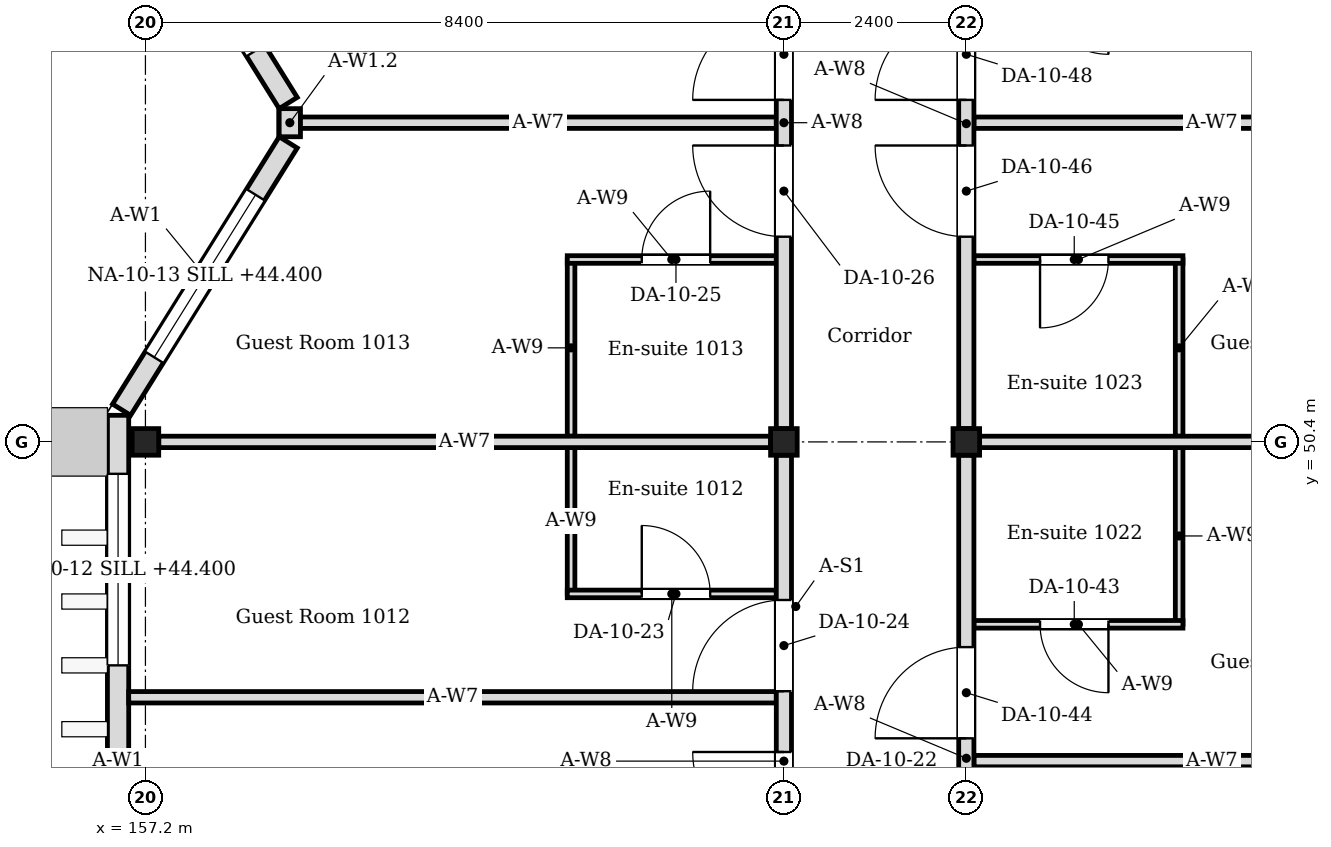
"""IFC4 building model, lengths in metres.
Left out: names, types, materials, properties, quantities, classifications, styles, units other than length and angle.
Written with IfcOpenShell. Run it as: python <this file> out.ifc"""

import sys

from ifc_helpers import new_model, si_unit, direction, frame, frame_2d, origin, origin_2d, place, context, subcontext, project, spatial, rectangle, i_section, extrude, element, fill, save


model = new_model("IFC4")
c1 = context("Model", 3, precision=1e-05, world=origin(), true_north=direction((0.0, 1.0)))
c2 = subcontext(c1, "Body", "Model", "MODEL_VIEW")
j1 = project(units=[si_unit("LENGTHUNIT", "METRE"), si_unit("PLANEANGLEUNIT", "RADIAN")], contexts=[c1])
p1 = place(None, origin())
s1 = spatial("IfcSite", under=j1, at=p1, CompositionType="ELEMENT")
p2 = place(p1, origin())
s2 = spatial("IfcBuilding", under=s1, at=p2, CompositionType="ELEMENT")
p3 = place(p2, frame((0.0, 0.0, 43.8)))
s3 = spatial("IfcBuildingStorey", under=s2, at=p3, CompositionType="ELEMENT", Elevation=43.8)
for number, where, z_axis, x_axis in (
    (1, (157.2, 50.4, 0.0), (0.0, 0.0, 1.0), (1.0, 0.0, 0.0)),
    (2, (165.6, 50.4, 0.0), (0.0, 0.0, 1.0), (1.0, 0.0, 0.0)),
    (3, (168.0, 50.4, 0.0), (0.0, 0.0, 1.0), (1.0, 0.0, 0.0)),
):
    element("IfcColumn", number, at=place(p3, frame(where, z_axis=z_axis, x_axis=x_axis)), inside=s3, PredefinedType="COLUMN", context=c2, shape_type="SweptSolid", body=[
        extrude(i_section(OverallWidth=0.35, OverallDepth=0.35, WebThickness=0.012, FlangeThickness=0.019, FilletRadius=0.013, at=origin_2d()), origin(), (0.0, 0.0, 1.0), 4.2),
    ])
p4 = place(p3, frame((156.84, 41.65, 0.0), z_axis=(0.0, 0.0, 1.0), x_axis=(0.0, 1.0, 0.0)))
e4 = element("IfcWall", 4, at=p4, inside=s3, PredefinedType="SOLIDWALL", context=c2, shape_type="SweptSolid", body=[
    extrude(rectangle(XDim=9.1, YDim=0.28, at=frame_2d((4.55, 0.0))), origin(), (0.0, 0.0, 1.0), 4.05),
])
p5 = place(p4, frame((1.61, 0.0, 0.6)))
e5 = element("IfcOpeningElement", 5, at=p5, cuts=e4, PredefinedType="OPENING", context=c2, shape_type="SweptSolid", body=[
    extrude(rectangle(XDim=2.52, YDim=2.4, at=frame_2d((1.26, 1.2))), frame((0.0, 0.15, 0.0), z_axis=(0.0, -1.0, 0.0), x_axis=(1.0, 0.0, 0.0)), (0.0, 0.0, 1.0), 0.3),
])
p6 = place(p4, frame((5.81, 0.0, 0.6)))
e6 = element("IfcOpeningElement", 6, at=p6, cuts=e4, PredefinedType="OPENING", context=c2, shape_type="SweptSolid", body=[
    extrude(rectangle(XDim=2.52, YDim=2.4, at=frame_2d((1.26, 1.2))), frame((0.0, 0.15, 0.0), z_axis=(0.0, -1.0, 0.0), x_axis=(1.0, 0.0, 0.0)), (0.0, 0.0, 1.0), 0.3),
])
p7 = place(p3, frame((156.886, 50.824, 0.0), z_axis=(0.0, 0.0, 1.0), x_axis=(0.529018946142, 0.848610013271, 0.0)))
e7 = element("IfcWall", 7, at=p7, inside=s3, PredefinedType="SOLIDWALL", context=c2, shape_type="SweptSolid", body=[
    extrude(rectangle(XDim=4.144, YDim=0.28, at=frame_2d((2.072, 0.0))), origin(), (0.0, 0.0, 1.0), 4.05),
])
p8 = place(p7, frame((0.812, 0.0, 0.6)))
e8 = element("IfcOpeningElement", 8, at=p8, cuts=e7, PredefinedType="OPENING", context=c2, shape_type="SweptSolid", body=[
    extrude(rectangle(XDim=2.52, YDim=2.4, at=frame_2d((1.26, 1.2))), frame((0.0, 0.15, 0.0), z_axis=(0.0, -1.0, 0.0), x_axis=(1.0, 0.0, 0.0)), (0.0, 0.0, 1.0), 0.3),
])
p9 = place(p3, frame((159.079, 54.859, 0.0), z_axis=(0.0, 0.0, 1.0), x_axis=(-0.528992500338, 0.848626498871, 0.0)))
e9 = element("IfcWall", 9, at=p9, inside=s3, PredefinedType="SOLIDWALL", context=c2, shape_type="SweptSolid", body=[
    extrude(rectangle(XDim=4.145, YDim=0.28, at=frame_2d((2.072, 0.0))), origin(), (0.0, 0.0, 1.0), 4.05),
])
p10 = place(p9, frame((0.812, 0.0, 0.6)))
e10 = element("IfcOpeningElement", 10, at=p10, cuts=e9, PredefinedType="OPENING", context=c2, shape_type="SweptSolid", body=[
    extrude(rectangle(XDim=2.52, YDim=2.4, at=frame_2d((1.26, 1.2))), frame((0.0, 0.15, 0.0), z_axis=(0.0, -1.0, 0.0), x_axis=(1.0, 0.0, 0.0)), (0.0, 0.0, 1.0), 0.3),
])
p11 = place(p3, frame((159.1, 54.415, 0.0), z_axis=(0.0, 0.0, 1.0), x_axis=(0.0, 1.0, 0.0)))
e11 = element("IfcWall", 11, at=p11, inside=s3, PredefinedType="SOLIDWALL", context=c2, shape_type="SweptSolid", body=[
    extrude(rectangle(XDim=0.37, YDim=0.28, at=frame_2d((0.185, 0.0))), origin(), (0.0, 0.0, 1.0), 3.604),
])
p12 = place(p3, frame((162.8, 48.4, 0.0), z_axis=(0.0, 0.0, 1.0), x_axis=(0.0, 1.0, 0.0)))
e12 = element("IfcWall", 12, at=p12, inside=s3, PredefinedType="PARTITIONING", context=c2, shape_type="SweptSolid", body=[
    extrude(rectangle(XDim=1.925, YDim=0.1, at=frame_2d((0.962, 0.0))), origin(), (0.0, 0.0, 1.0), 4.05),
])
p13 = place(p3, frame((162.75, 48.4, 0.0), z_axis=(0.0, 0.0, 1.0), x_axis=(1.0, 0.0, 0.0)))
e13 = element("IfcWall", 13, at=p13, inside=s3, PredefinedType="PARTITIONING", context=c2, shape_type="SweptSolid", body=[
    extrude(rectangle(XDim=2.75, YDim=0.1, at=frame_2d((1.375, 0.0))), origin(), (0.0, 0.0, 1.0), 4.05),
])
p14 = place(p13, frame((0.98, 0.0, 0.0)))
e14 = element("IfcOpeningElement", 14, at=p14, cuts=e13, PredefinedType="OPENING", context=c2, shape_type="SweptSolid", body=[
    extrude(rectangle(XDim=0.9, YDim=2.1, at=frame_2d((0.45, 1.05))), frame((0.0, 0.06, 0.0), z_axis=(0.0, -1.0, 0.0), x_axis=(1.0, 0.0, 0.0)), (0.0, 0.0, 1.0), 0.12),
])
p15 = place(p3, frame((162.8, 50.475, 0.0), z_axis=(0.0, 0.0, 1.0), x_axis=(0.0, 1.0, 0.0)))
e15 = element("IfcWall", 15, at=p15, inside=s3, PredefinedType="PARTITIONING", context=c2, shape_type="SweptSolid", body=[
    extrude(rectangle(XDim=2.325, YDim=0.1, at=frame_2d((1.163, 0.0))), origin(), (0.0, 0.0, 1.0), 4.05),
])
p16 = place(p3, frame((162.75, 52.8, 0.0), z_axis=(0.0, 0.0, 1.0), x_axis=(1.0, 0.0, 0.0)))
e16 = element("IfcWall", 16, at=p16, inside=s3, PredefinedType="PARTITIONING", context=c2, shape_type="SweptSolid", body=[
    extrude(rectangle(XDim=2.75, YDim=0.1, at=frame_2d((1.375, 0.0))), origin(), (0.0, 0.0, 1.0), 4.05),
])
p17 = place(p16, frame((0.98, 0.0, 0.0)))
e17 = element("IfcOpeningElement", 17, at=p17, cuts=e16, PredefinedType="OPENING", context=c2, shape_type="SweptSolid", body=[
    extrude(rectangle(XDim=0.9, YDim=2.1, at=frame_2d((0.45, 1.05))), frame((0.0, 0.06, 0.0), z_axis=(0.0, -1.0, 0.0), x_axis=(1.0, 0.0, 0.0)), (0.0, 0.0, 1.0), 0.12),
])
p18 = place(p3, frame((170.8, 48.0, 0.0), z_axis=(0.0, 0.0, 1.0), x_axis=(0.0, 1.0, 0.0)))
e18 = element("IfcWall", 18, at=p18, inside=s3, PredefinedType="PARTITIONING", context=c2, shape_type="SweptSolid", body=[
    extrude(rectangle(XDim=2.325, YDim=0.1, at=frame_2d((1.163, 0.0))), origin(), (0.0, 0.0, 1.0), 4.05),
])
p19 = place(p3, frame((170.85, 48.0, 0.0), z_axis=(0.0, 0.0, 1.0), x_axis=(-1.0, 0.0, 0.0)))
e19 = element("IfcWall", 19, at=p19, inside=s3, PredefinedType="PARTITIONING", context=c2, shape_type="SweptSolid", body=[
    extrude(rectangle(XDim=2.75, YDim=0.1, at=frame_2d((1.375, 0.0))), origin(), (0.0, 0.0, 1.0), 4.05),
])
p20 = place(p19, frame((0.98, 0.0, 0.0)))
e20 = element("IfcOpeningElement", 20, at=p20, cuts=e19, PredefinedType="OPENING", context=c2, shape_type="SweptSolid", body=[
    extrude(rectangle(XDim=0.9, YDim=2.1, at=frame_2d((0.45, 1.05))), frame((0.0, 0.06, 0.0), z_axis=(0.0, -1.0, 0.0), x_axis=(1.0, 0.0, 0.0)), (0.0, 0.0, 1.0), 0.12),
])
p21 = place(p3, frame((170.8, 50.475, 0.0), z_axis=(0.0, 0.0, 1.0), x_axis=(0.0, 1.0, 0.0)))
e21 = element("IfcWall", 21, at=p21, inside=s3, PredefinedType="PARTITIONING", context=c2, shape_type="SweptSolid", body=[
    extrude(rectangle(XDim=2.325, YDim=0.1, at=frame_2d((1.163, 0.0))), origin(), (0.0, 0.0, 1.0), 4.05),
])
p22 = place(p3, frame((170.85, 52.8, 0.0), z_axis=(0.0, 0.0, 1.0), x_axis=(-1.0, 0.0, 0.0)))
e22 = element("IfcWall", 22, at=p22, inside=s3, PredefinedType="PARTITIONING", context=c2, shape_type="SweptSolid", body=[
    extrude(rectangle(XDim=2.75, YDim=0.1, at=frame_2d((1.375, 0.0))), origin(), (0.0, 0.0, 1.0), 4.05),
])
p23 = place(p22, frame((0.98, 0.0, 0.0)))
e23 = element("IfcOpeningElement", 23, at=p23, cuts=e22, PredefinedType="OPENING", context=c2, shape_type="SweptSolid", body=[
    extrude(rectangle(XDim=0.9, YDim=2.1, at=frame_2d((0.45, 1.05))), frame((0.0, 0.06, 0.0), z_axis=(0.0, -1.0, 0.0), x_axis=(1.0, 0.0, 0.0)), (0.0, 0.0, 1.0), 0.12),
])
for number, where, z_axis, x_axis in (
    (24, (157.375, 50.4, 0.0), (0.0, 0.0, 1.0), (1.0, 0.0, 0.0)),
    (25, (168.175, 50.4, 0.0), (0.0, 0.0, 1.0), (1.0, 0.0, 0.0)),
):
    element("IfcWall", number, at=place(p3, frame(where, z_axis=z_axis, x_axis=x_axis)), inside=s3, PredefinedType="PARTITIONING", context=c2, shape_type="SweptSolid", body=[
        extrude(rectangle(XDim=8.05, YDim=0.15, at=frame_2d((4.025, 0.0))), origin(), (0.0, 0.0, 1.0), 3.604),
    ])
p24 = place(p3, frame((156.98, 47.04, 0.0), z_axis=(0.0, 0.0, 1.0), x_axis=(1.0, 0.0, 0.0)))
e26 = element("IfcWall", 26, at=p24, inside=s3, PredefinedType="PARTITIONING", context=c2, shape_type="SweptSolid", body=[
    extrude(rectangle(XDim=8.52, YDim=0.15, at=frame_2d((4.26, 0.0))), origin(), (0.0, 0.0, 1.0), 3.604),
])
for number, where, z_axis, x_axis in (
    (27, (159.24, 54.6, 0.0), (0.0, 0.0, 1.0), (1.0, 0.0, 0.0)),
    (28, (168.1, 46.2, 0.0), (0.0, 0.0, 1.0), (1.0, 0.0, 0.0)),
    (29, (168.1, 54.6, 0.0), (0.0, 0.0, 1.0), (1.0, 0.0, 0.0)),
):
    element("IfcWall", number, at=place(p3, frame(where, z_axis=z_axis, x_axis=x_axis)), inside=s3, PredefinedType="PARTITIONING", context=c2, shape_type="SweptSolid", body=[
        extrude(rectangle(XDim=6.26, YDim=0.15, at=frame_2d((3.13, 0.0))), origin(), (0.0, 0.0, 1.0), 3.604),
    ])
p25 = place(p3, frame((165.6, 42.175, 0.0), z_axis=(0.0, 0.0, 1.0), x_axis=(0.0, 1.0, 0.0)))
e30 = element("IfcWall", 30, at=p25, inside=s3, PredefinedType="PARTITIONING", context=c2, shape_type="SweptSolid", body=[
    extrude(rectangle(XDim=8.05, YDim=0.2, at=frame_2d((4.025, 0.0))), origin(), (0.0, 0.0, 1.0), 3.45),
])
p26 = place(p25, frame((2.945, 0.0, 0.0)))
e31 = element("IfcOpeningElement", 31, at=p26, cuts=e30, PredefinedType="OPENING", context=c2, shape_type="SweptSolid", body=[
    extrude(rectangle(XDim=1.2, YDim=2.1, at=frame_2d((0.6, 1.05))), frame((0.0, 0.11, 0.0), z_axis=(0.0, -1.0, 0.0), x_axis=(1.0, 0.0, 0.0)), (0.0, 0.0, 1.0), 0.22),
])
p27 = place(p25, frame((4.945, 0.0, 0.0)))
e32 = element("IfcOpeningElement", 32, at=p27, cuts=e30, PredefinedType="OPENING", context=c2, shape_type="SweptSolid", body=[
    extrude(rectangle(XDim=1.2, YDim=2.1, at=frame_2d((0.6, 1.05))), frame((0.0, 0.11, 0.0), z_axis=(0.0, -1.0, 0.0), x_axis=(1.0, 0.0, 0.0)), (0.0, 0.0, 1.0), 0.22),
])
p28 = place(p3, frame((165.6, 50.575, 0.0), z_axis=(0.0, 0.0, 1.0), x_axis=(0.0, 1.0, 0.0)))
e33 = element("IfcWall", 33, at=p28, inside=s3, PredefinedType="PARTITIONING", context=c2, shape_type="SweptSolid", body=[
    extrude(rectangle(XDim=8.05, YDim=0.2, at=frame_2d((4.025, 0.0))), origin(), (0.0, 0.0, 1.0), 3.45),
])
p29 = place(p28, frame((2.525, 0.0, 0.0)))
e34 = element("IfcOpeningElement", 34, at=p29, cuts=e33, PredefinedType="OPENING", context=c2, shape_type="SweptSolid", body=[
    extrude(rectangle(XDim=1.2, YDim=2.1, at=frame_2d((0.6, 1.05))), frame((0.0, 0.11, 0.0), z_axis=(0.0, -1.0, 0.0), x_axis=(1.0, 0.0, 0.0)), (0.0, 0.0, 1.0), 0.22),
])
p30 = place(p28, frame((4.325, 0.0, 0.0)))
e35 = element("IfcOpeningElement", 35, at=p30, cuts=e33, PredefinedType="OPENING", context=c2, shape_type="SweptSolid", body=[
    extrude(rectangle(XDim=1.2, YDim=2.1, at=frame_2d((0.6, 1.05))), frame((0.0, 0.11, 0.0), z_axis=(0.0, -1.0, 0.0), x_axis=(1.0, 0.0, 0.0)), (0.0, 0.0, 1.0), 0.22),
])
p31 = place(p3, frame((168.0, 42.25, 0.0), z_axis=(0.0, 0.0, 1.0), x_axis=(0.0, 1.0, 0.0)))
e36 = element("IfcWall", 36, at=p31, inside=s3, PredefinedType="PARTITIONING", context=c2, shape_type="SweptSolid", body=[
    extrude(rectangle(XDim=7.975, YDim=0.2, at=frame_2d((3.988, 0.0))), origin(), (0.0, 0.0, 1.0), 3.45),
])
p32 = place(p31, frame((2.45, 0.0, 0.0)))
e37 = element("IfcOpeningElement", 37, at=p32, cuts=e36, PredefinedType="OPENING", context=c2, shape_type="SweptSolid", body=[
    extrude(rectangle(XDim=1.2, YDim=2.1, at=frame_2d((0.6, 1.05))), frame((0.0, 0.11, 0.0), z_axis=(0.0, -1.0, 0.0), x_axis=(1.0, 0.0, 0.0)), (0.0, 0.0, 1.0), 0.22),
])
p33 = place(p31, frame((4.25, 0.0, 0.0)))
e38 = element("IfcOpeningElement", 38, at=p33, cuts=e36, PredefinedType="OPENING", context=c2, shape_type="SweptSolid", body=[
    extrude(rectangle(XDim=1.2, YDim=2.1, at=frame_2d((0.6, 1.05))), frame((0.0, 0.11, 0.0), z_axis=(0.0, -1.0, 0.0), x_axis=(1.0, 0.0, 0.0)), (0.0, 0.0, 1.0), 0.22),
])
p34 = place(p3, frame((168.0, 50.575, 0.0), z_axis=(0.0, 0.0, 1.0), x_axis=(0.0, 1.0, 0.0)))
e39 = element("IfcWall", 39, at=p34, inside=s3, PredefinedType="PARTITIONING", context=c2, shape_type="SweptSolid", body=[
    extrude(rectangle(XDim=8.025, YDim=0.2, at=frame_2d((4.013, 0.0))), origin(), (0.0, 0.0, 1.0), 3.45),
])
p35 = place(p34, frame((2.525, 0.0, 0.0)))
e40 = element("IfcOpeningElement", 40, at=p35, cuts=e39, PredefinedType="OPENING", context=c2, shape_type="SweptSolid", body=[
    extrude(rectangle(XDim=1.2, YDim=2.1, at=frame_2d((0.6, 1.05))), frame((0.0, 0.11, 0.0), z_axis=(0.0, -1.0, 0.0), x_axis=(1.0, 0.0, 0.0)), (0.0, 0.0, 1.0), 0.22),
])
p36 = place(p34, frame((4.325, 0.0, 0.0)))
e41 = element("IfcOpeningElement", 41, at=p36, cuts=e39, PredefinedType="OPENING", context=c2, shape_type="SweptSolid", body=[
    extrude(rectangle(XDim=1.2, YDim=2.1, at=frame_2d((0.6, 1.05))), frame((0.0, 0.11, 0.0), z_axis=(0.0, -1.0, 0.0), x_axis=(1.0, 0.0, 0.0)), (0.0, 0.0, 1.0), 0.22),
])
p37 = place(p6, origin())
e42 = element("IfcWindow", 42, at=p37, inside=s3, PartitioningType="SINGLE_PANEL", PredefinedType="WINDOW", context=c2, shape_type="SweptSolid", body=[
    extrude(rectangle(XDim=2.52, YDim=2.4, at=frame_2d((1.26, 1.2))), frame((0.0, 0.03, 0.0), z_axis=(0.0, -1.0, 0.0), x_axis=(1.0, 0.0, 0.0)), (0.0, 0.0, 1.0), 0.06),
])
fill(e6, e42)
p38 = place(p8, origin())
e43 = element("IfcWindow", 43, at=p38, inside=s3, PartitioningType="SINGLE_PANEL", PredefinedType="WINDOW", context=c2, shape_type="SweptSolid", body=[
    extrude(rectangle(XDim=2.52, YDim=2.4, at=frame_2d((1.26, 1.2))), frame((0.0, 0.03, 0.0), z_axis=(0.0, -1.0, 0.0), x_axis=(1.0, 0.0, 0.0)), (0.0, 0.0, 1.0), 0.06),
])
fill(e8, e43)
p39 = place(p26, origin())
e44 = element("IfcDoor", 44, at=p39, inside=s3, OperationType="SINGLE_SWING_RIGHT", PredefinedType="DOOR", context=c2, shape_type="SweptSolid", body=[
    extrude(rectangle(XDim=1.2, YDim=2.1, at=frame_2d((0.6, 1.05))), frame((0.0, 0.025, 0.0), z_axis=(0.0, -1.0, 0.0), x_axis=(1.0, 0.0, 0.0)), (0.0, 0.0, 1.0), 0.05),
])
fill(e31, e44)
p40 = place(p14, origin())
e45 = element("IfcDoor", 45, at=p40, inside=s3, OperationType="SINGLE_SWING_LEFT", PredefinedType="DOOR", context=c2, shape_type="SweptSolid", body=[
    extrude(rectangle(XDim=0.9, YDim=2.1, at=frame_2d((0.45, 1.05))), frame((0.0, 0.025, 0.0), z_axis=(0.0, -1.0, 0.0), x_axis=(1.0, 0.0, 0.0)), (0.0, 0.0, 1.0), 0.05),
])
fill(e14, e45)
p41 = place(p27, origin())
e46 = element("IfcDoor", 46, at=p41, inside=s3, OperationType="SINGLE_SWING_LEFT", PredefinedType="DOOR", context=c2, shape_type="SweptSolid", body=[
    extrude(rectangle(XDim=1.2, YDim=2.1, at=frame_2d((0.6, 1.05))), frame((0.0, 0.025, 0.0), z_axis=(0.0, -1.0, 0.0), x_axis=(1.0, 0.0, 0.0)), (0.0, 0.0, 1.0), 0.05),
])
fill(e32, e46)
p42 = place(p17, origin())
e47 = element("IfcDoor", 47, at=p42, inside=s3, OperationType="SINGLE_SWING_RIGHT", PredefinedType="DOOR", context=c2, shape_type="SweptSolid", body=[
    extrude(rectangle(XDim=0.9, YDim=2.1, at=frame_2d((0.45, 1.05))), frame((0.0, 0.025, 0.0), z_axis=(0.0, -1.0, 0.0), x_axis=(1.0, 0.0, 0.0)), (0.0, 0.0, 1.0), 0.05),
])
fill(e17, e47)
p43 = place(p29, origin())
e48 = element("IfcDoor", 48, at=p43, inside=s3, OperationType="SINGLE_SWING_RIGHT", PredefinedType="DOOR", context=c2, shape_type="SweptSolid", body=[
    extrude(rectangle(XDim=1.2, YDim=2.1, at=frame_2d((0.6, 1.05))), frame((0.0, 0.025, 0.0), z_axis=(0.0, -1.0, 0.0), x_axis=(1.0, 0.0, 0.0)), (0.0, 0.0, 1.0), 0.05),
])
fill(e34, e48)
p44 = place(p30, origin())
e49 = element("IfcDoor", 49, at=p44, inside=s3, OperationType="SINGLE_SWING_LEFT", PredefinedType="DOOR", context=c2, shape_type="SweptSolid", body=[
    extrude(rectangle(XDim=1.2, YDim=2.1, at=frame_2d((0.6, 1.05))), frame((0.0, 0.025, 0.0), z_axis=(0.0, -1.0, 0.0), x_axis=(1.0, 0.0, 0.0)), (0.0, 0.0, 1.0), 0.05),
])
fill(e35, e49)
p45 = place(p20, origin())
e50 = element("IfcDoor", 50, at=p45, inside=s3, OperationType="SINGLE_SWING_LEFT", PredefinedType="DOOR", context=c2, shape_type="SweptSolid", body=[
    extrude(rectangle(XDim=0.9, YDim=2.1, at=frame_2d((0.45, 1.05))), frame((0.0, 0.025, 0.0), z_axis=(0.0, -1.0, 0.0), x_axis=(1.0, 0.0, 0.0)), (0.0, 0.0, 1.0), 0.05),
])
fill(e20, e50)
p46 = place(p33, origin())
e51 = element("IfcDoor", 51, at=p46, inside=s3, OperationType="SINGLE_SWING_LEFT", PredefinedType="DOOR", context=c2, shape_type="SweptSolid", body=[
    extrude(rectangle(XDim=1.2, YDim=2.1, at=frame_2d((0.6, 1.05))), frame((0.0, 0.025, 0.0), z_axis=(0.0, -1.0, 0.0), x_axis=(1.0, 0.0, 0.0)), (0.0, 0.0, 1.0), 0.05),
])
fill(e38, e51)
p47 = place(p23, origin())
e52 = element("IfcDoor", 52, at=p47, inside=s3, OperationType="SINGLE_SWING_RIGHT", PredefinedType="DOOR", context=c2, shape_type="SweptSolid", body=[
    extrude(rectangle(XDim=0.9, YDim=2.1, at=frame_2d((0.45, 1.05))), frame((0.0, 0.025, 0.0), z_axis=(0.0, -1.0, 0.0), x_axis=(1.0, 0.0, 0.0)), (0.0, 0.0, 1.0), 0.05),
])
fill(e23, e52)
p48 = place(p35, origin())
e53 = element("IfcDoor", 53, at=p48, inside=s3, OperationType="SINGLE_SWING_RIGHT", PredefinedType="DOOR", context=c2, shape_type="SweptSolid", body=[
    extrude(rectangle(XDim=1.2, YDim=2.1, at=frame_2d((0.6, 1.05))), frame((0.0, 0.025, 0.0), z_axis=(0.0, -1.0, 0.0), x_axis=(1.0, 0.0, 0.0)), (0.0, 0.0, 1.0), 0.05),
])
fill(e40, e53)
p49 = place(p36, origin())
e54 = element("IfcDoor", 54, at=p49, inside=s3, OperationType="SINGLE_SWING_LEFT", PredefinedType="DOOR", context=c2, shape_type="SweptSolid", body=[
    extrude(rectangle(XDim=1.2, YDim=2.1, at=frame_2d((0.6, 1.05))), frame((0.0, 0.025, 0.0), z_axis=(0.0, -1.0, 0.0), x_axis=(1.0, 0.0, 0.0)), (0.0, 0.0, 1.0), 0.05),
])
fill(e41, e54)
save(model, sys.argv[1])
